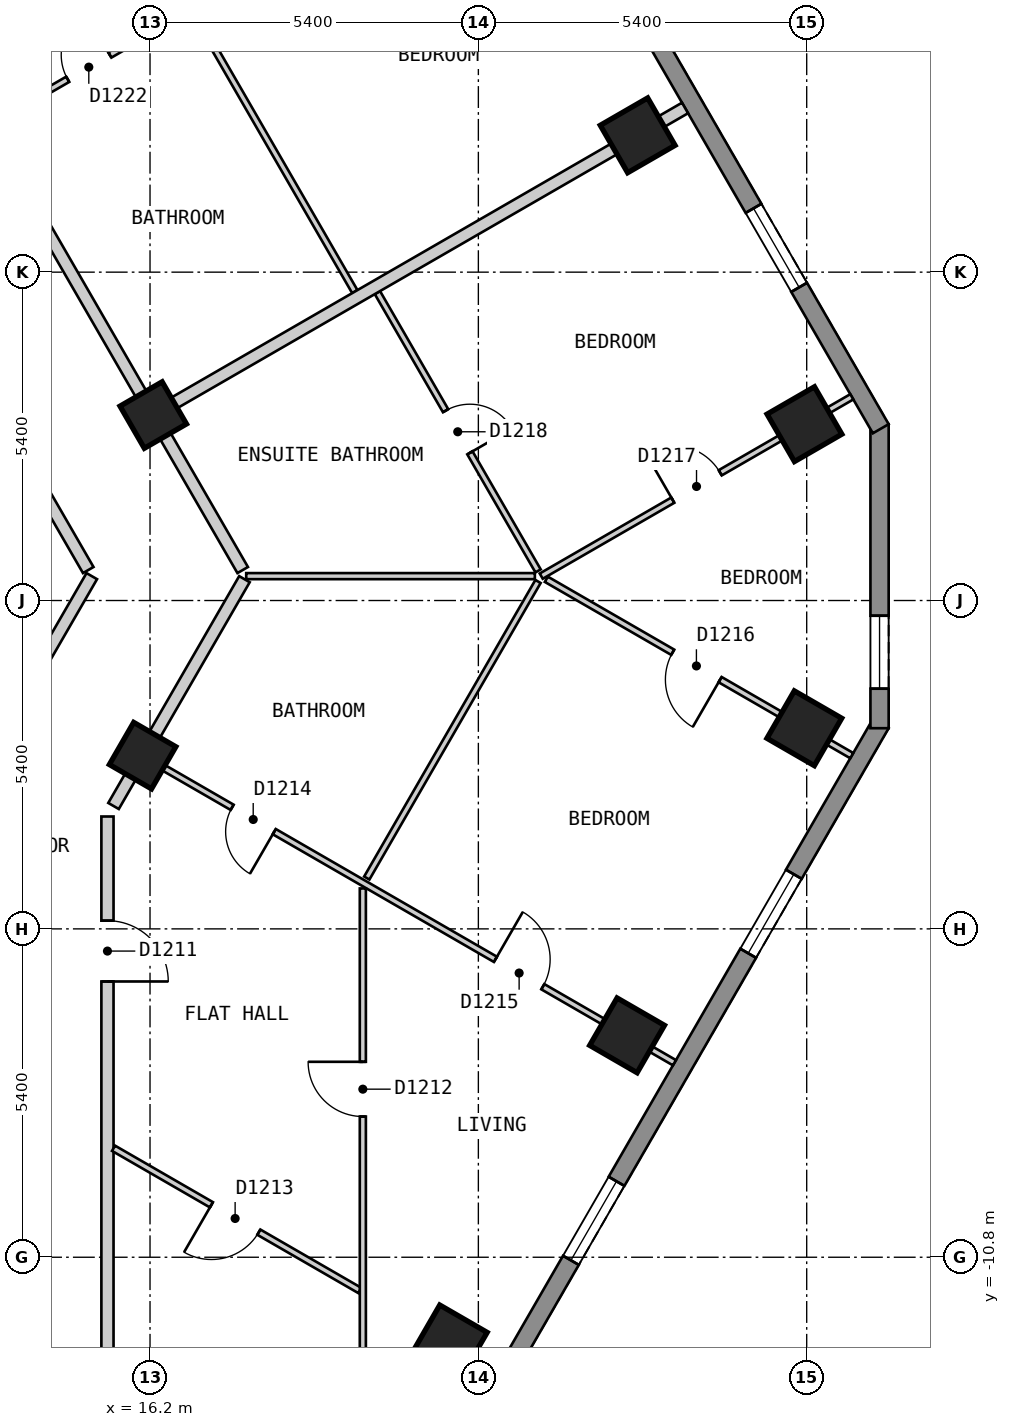
"""IFC4 building model, lengths in metres.
Left out: names, types, materials, properties, quantities, classifications, styles, units other than length and angle.
Written with IfcOpenShell. Run it as: python <this file> out.ifc"""

import sys

from ifc_helpers import new_model, si_unit, direction, frame, frame_2d, origin, origin_2d, place, context, subcontext, project, spatial, polyline, rectangle, outline, extrude, element, fill, save


model = new_model("IFC4")
c1 = context("Model", 3, precision=1e-05, world=origin(), true_north=direction((0.0, 1.0)))
c2 = subcontext(c1, "Body", "Model", "MODEL_VIEW")
j1 = project(units=[si_unit("LENGTHUNIT", "METRE"), si_unit("PLANEANGLEUNIT", "RADIAN")], contexts=[c1])
p1 = place(None, origin())
s1 = spatial("IfcSite", under=j1, at=p1, CompositionType="ELEMENT")
p2 = place(p1, origin())
s2 = spatial("IfcBuilding", under=s1, at=p2, CompositionType="ELEMENT")
p3 = place(p2, frame((0.0, 0.0, 129.6)))
s3 = spatial("IfcBuildingStorey", under=s2, at=p3, CompositionType="ELEMENT", Elevation=129.6)
for number, where, z_axis, x_axis in (
    (1, (21.13, -12.201, 0.0), (0.0, 0.0, 1.0), (0.5, 0.866, 0.0)),
    (2, (24.046, -7.151, 0.0), (0.0, 0.0, 1.0), (0.5, 0.866, 0.0)),
    (3, (26.961, -2.101, 0.0), (0.0, 0.0, 1.0), (0.5, 0.866, 0.0)),
    (4, (26.963, 2.9, 0.0), (0.0, 0.0, 1.0), (-0.5, 0.866, 0.0)),
    (5, (24.22, 7.65, 0.0), (0.0, 0.0, 1.0), (-0.5, 0.866, 0.0)),
):
    element("IfcColumn", number, at=place(p3, frame(where, z_axis=z_axis, x_axis=x_axis)), inside=s3, PredefinedType="COLUMN", context=c2, shape_type="SweptSolid", body=[
        extrude(rectangle(XDim=0.9, YDim=0.9, at=origin_2d()), origin(), (0.0, 0.0, 1.0), 3.0),
    ])
for number, where, z_axis, x_axis in (
    (6, (16.078, -2.551, 0.0), (0.0, 0.0, 1.0), (0.5, 0.866, 0.0)),
    (7, (16.253, 3.05, 0.0), (0.0, 0.0, 1.0), (-0.5, 0.866, 0.0)),
):
    element("IfcColumn", number, at=place(p3, frame(where, z_axis=z_axis, x_axis=x_axis)), inside=s3, PredefinedType="COLUMN", context=c2, shape_type="SweptSolid", body=[
        extrude(rectangle(XDim=0.8, YDim=0.8, at=origin_2d()), origin(), (0.0, 0.0, 1.0), 3.0),
    ])
p4 = place(p3, frame((15.862, -23.425, 0.0), z_axis=(0.0, 0.0, 1.0), x_axis=(0.500017503135, 0.866015298109, 0.0)))
e8 = element("IfcWall", 8, at=p4, inside=s3, PredefinedType="SOLIDWALL", context=c2, shape_type="SweptSolid", body=[
    extrude(outline(polyline([(0.0, -0.15), (24.711, -0.15), (24.631, 0.15), (0.08, 0.15), (0.0, -0.15)])), origin(), (0.0, 0.0, 1.0), 2.7),
])
p5 = place(p4, frame((2.857, 0.0, 0.15)))
e9 = element("IfcOpeningElement", 9, at=p5, cuts=e8, PredefinedType="OPENING", context=c2, shape_type="SweptSolid", body=[
    extrude(rectangle(XDim=1.5, YDim=2.1, at=frame_2d((0.75, 1.05))), frame((0.0, 0.16, 0.0), z_axis=(0.0, -1.0, 0.0), x_axis=(1.0, 0.0, 0.0)), (0.0, 0.0, 1.0), 0.32),
])
p6 = place(p4, frame((8.689, 0.0, 0.15)))
e10 = element("IfcOpeningElement", 10, at=p6, cuts=e8, PredefinedType="OPENING", context=c2, shape_type="SweptSolid", body=[
    extrude(rectangle(XDim=1.5, YDim=2.1, at=frame_2d((0.75, 1.05))), frame((0.0, 0.16, 0.0), z_axis=(0.0, -1.0, 0.0), x_axis=(1.0, 0.0, 0.0)), (0.0, 0.0, 1.0), 0.32),
])
p7 = place(p4, frame((14.52, 0.0, 0.15)))
e11 = element("IfcOpeningElement", 11, at=p7, cuts=e8, PredefinedType="OPENING", context=c2, shape_type="SweptSolid", body=[
    extrude(rectangle(XDim=1.5, YDim=2.1, at=frame_2d((0.75, 1.05))), frame((0.0, 0.16, 0.0), z_axis=(0.0, -1.0, 0.0), x_axis=(1.0, 0.0, 0.0)), (0.0, 0.0, 1.0), 0.32),
])
p8 = place(p4, frame((20.351, 0.0, 0.15)))
e12 = element("IfcOpeningElement", 12, at=p8, cuts=e8, PredefinedType="OPENING", context=c2, shape_type="SweptSolid", body=[
    extrude(rectangle(XDim=1.5, YDim=2.1, at=frame_2d((0.75, 1.05))), frame((0.0, 0.16, 0.0), z_axis=(0.0, -1.0, 0.0), x_axis=(1.0, 0.0, 0.0)), (0.0, 0.0, 1.0), 0.32),
])
p9 = place(p3, frame((28.198, -2.1, 0.0), z_axis=(0.0, 0.0, 1.0), x_axis=(0.0, 1.0, 0.0)))
e13 = element("IfcWall", 13, at=p9, inside=s3, PredefinedType="SOLIDWALL", context=c2, shape_type="SweptSolid", body=[
    extrude(outline(polyline([(0.0, -0.15), (5.0, -0.15), (4.92, 0.15), (0.08, 0.15), (0.0, -0.15)])), origin(), (0.0, 0.0, 1.0), 2.7),
])
p10 = place(p9, frame((0.65, 0.0, 0.15)))
e14 = element("IfcOpeningElement", 14, at=p10, cuts=e13, PredefinedType="OPENING", context=c2, shape_type="SweptSolid", body=[
    extrude(rectangle(XDim=1.2, YDim=2.1, at=frame_2d((0.6, 1.05))), frame((0.0, 0.16, 0.0), z_axis=(0.0, -1.0, 0.0), x_axis=(1.0, 0.0, 0.0)), (0.0, 0.0, 1.0), 0.32),
])
p11 = place(p3, frame((28.218, 2.825, 0.0), z_axis=(0.0, 0.0, 1.0), x_axis=(-0.500020536353, 0.866013546791, 0.0)))
e15 = element("IfcWall", 15, at=p11, inside=s3, PredefinedType="SOLIDWALL", context=c2, shape_type="SweptSolid", body=[
    extrude(outline(polyline([(0.0, -0.15), (23.325, -0.15), (23.245, 0.15), (0.08, 0.15), (0.0, -0.15)])), origin(), (0.0, 0.0, 1.0), 2.7),
])
p12 = place(p11, frame((2.685, 0.0, 0.15)))
e16 = element("IfcOpeningElement", 16, at=p12, cuts=e15, PredefinedType="OPENING", context=c2, shape_type="SweptSolid", body=[
    extrude(rectangle(XDim=1.5, YDim=2.1, at=frame_2d((0.75, 1.05))), frame((0.0, 0.16, 0.0), z_axis=(0.0, -1.0, 0.0), x_axis=(1.0, 0.0, 0.0)), (0.0, 0.0, 1.0), 0.32),
])
p13 = place(p11, frame((8.17, 0.0, 0.15)))
e17 = element("IfcOpeningElement", 17, at=p13, cuts=e15, PredefinedType="OPENING", context=c2, shape_type="SweptSolid", body=[
    extrude(rectangle(XDim=1.5, YDim=2.1, at=frame_2d((0.75, 1.05))), frame((0.0, 0.16, 0.0), z_axis=(0.0, -1.0, 0.0), x_axis=(1.0, 0.0, 0.0)), (0.0, 0.0, 1.0), 0.32),
])
p14 = place(p11, frame((13.655, 0.0, 0.15)))
e18 = element("IfcOpeningElement", 18, at=p14, cuts=e15, PredefinedType="OPENING", context=c2, shape_type="SweptSolid", body=[
    extrude(rectangle(XDim=1.5, YDim=2.1, at=frame_2d((0.75, 1.05))), frame((0.0, 0.16, 0.0), z_axis=(0.0, -1.0, 0.0), x_axis=(1.0, 0.0, 0.0)), (0.0, 0.0, 1.0), 0.32),
])
p15 = place(p11, frame((19.14, 0.0, 0.15)))
e19 = element("IfcOpeningElement", 19, at=p15, cuts=e15, PredefinedType="OPENING", context=c2, shape_type="SweptSolid", body=[
    extrude(rectangle(XDim=1.5, YDim=2.1, at=frame_2d((0.75, 1.05))), frame((0.0, 0.16, 0.0), z_axis=(0.0, -1.0, 0.0), x_axis=(1.0, 0.0, 0.0)), (0.0, 0.0, 1.0), 0.32),
])
p16 = place(p3, frame((7.967, 13.0, 0.0), z_axis=(0.0, 0.0, 1.0), x_axis=(0.50003774998, -0.866003607726, 0.0)))
e20 = element("IfcWall", 20, at=p16, inside=s3, PredefinedType="PARTITIONING", context=c2, shape_type="SweptSolid", body=[
    extrude(rectangle(XDim=14.433, YDim=0.2, at=frame_2d((7.217, 0.0))), origin(), (0.0, 0.0, 1.0), 2.7),
])
p17 = place(p16, frame((6.824, 0.0, 0.0)))
e21 = element("IfcOpeningElement", 21, at=p17, cuts=e20, PredefinedType="OPENING", context=c2, shape_type="SweptSolid", body=[
    extrude(rectangle(XDim=0.9, YDim=2.1, at=frame_2d((0.45, 1.05))), frame((0.0, 0.11, 0.0), z_axis=(0.0, -1.0, 0.0), x_axis=(1.0, 0.0, 0.0)), (0.0, 0.0, 1.0), 0.22),
])
p18 = place(p3, frame((9.296, 15.1, 0.0), z_axis=(0.0, 0.0, 1.0), x_axis=(0.499974024244, -0.866040400375, 0.0)))
e22 = element("IfcWall", 22, at=p18, inside=s3, PredefinedType="PARTITIONING", context=c2, shape_type="SweptSolid", body=[
    extrude(rectangle(XDim=16.857, YDim=0.2, at=frame_2d((8.429, 0.0))), origin(), (0.0, 0.0, 1.0), 2.7),
])
p19 = place(p18, frame((5.187, 0.0, 0.0)))
e23 = element("IfcOpeningElement", 23, at=p19, cuts=e22, PredefinedType="OPENING", context=c2, shape_type="SweptSolid", body=[
    extrude(rectangle(XDim=1.0, YDim=2.1, at=frame_2d((0.5, 1.05))), frame((0.0, 0.11, 0.0), z_axis=(0.0, -1.0, 0.0), x_axis=(1.0, 0.0, 0.0)), (0.0, 0.0, 1.0), 0.22),
])
p20 = place(p3, frame((13.394, -2.8, 0.0), z_axis=(0.0, 0.0, 1.0), x_axis=(0.499968324138, 0.866043691079, 0.0)))
e24 = element("IfcWall", 24, at=p20, inside=s3, PredefinedType="PARTITIONING", context=c2, shape_type="SweptSolid", body=[
    extrude(rectangle(XDim=3.696, YDim=0.2, at=frame_2d((1.848, 0.0))), origin(), (0.0, 0.0, 1.0), 2.7),
])
p21 = place(p3, frame((15.6, -3.379, 0.0), z_axis=(0.0, 0.0, 1.0), x_axis=(0.499882759391, 0.866093082101, 0.0)))
e25 = element("IfcWall", 25, at=p21, inside=s3, PredefinedType="PARTITIONING", context=c2, shape_type="SweptSolid", body=[
    extrude(rectangle(XDim=4.307, YDim=0.2, at=frame_2d((2.153, 0.0))), origin(), (0.0, 0.0, 1.0), 2.7),
])
p22 = place(p3, frame((15.5, -21.199, 0.0), z_axis=(0.0, 0.0, 1.0), x_axis=(0.0, 1.0, 0.0)))
e26 = element("IfcWall", 26, at=p22, inside=s3, PredefinedType="PARTITIONING", context=c2, shape_type="SweptSolid", body=[
    extrude(rectangle(XDim=17.647, YDim=0.2, at=frame_2d((8.823, 0.0))), origin(), (0.0, 0.0, 1.0), 2.7),
])
p23 = place(p22, frame((14.934, 0.0, 0.0)))
e27 = element("IfcOpeningElement", 27, at=p23, cuts=e26, PredefinedType="OPENING", context=c2, shape_type="SweptSolid", body=[
    extrude(rectangle(XDim=1.0, YDim=2.1, at=frame_2d((0.5, 1.05))), frame((0.0, 0.11, 0.0), z_axis=(0.0, -1.0, 0.0), x_axis=(1.0, 0.0, 0.0)), (0.0, 0.0, 1.0), 0.22),
])
p24 = place(p3, frame((11.539, 18.986, 0.0), z_axis=(0.0, 0.0, 1.0), x_axis=(0.500019453803, -0.866014171835, 0.0)))
e28 = element("IfcWall", 28, at=p24, inside=s3, PredefinedType="PARTITIONING", context=c2, shape_type="SweptSolid", body=[
    extrude(rectangle(XDim=16.057, YDim=0.1, at=frame_2d((8.029, 0.0))), origin(), (0.0, 0.0, 1.0), 2.7),
])
p25 = place(p24, frame((7.48, 0.0, 0.0)))
e29 = element("IfcOpeningElement", 29, at=p25, cuts=e28, PredefinedType="OPENING", context=c2, shape_type="SweptSolid", body=[
    extrude(rectangle(XDim=0.9, YDim=2.1, at=frame_2d((0.45, 1.05))), frame((0.0, 0.06, 0.0), z_axis=(0.0, -1.0, 0.0), x_axis=(1.0, 0.0, 0.0)), (0.0, 0.0, 1.0), 0.12),
])
p26 = place(p3, frame((19.94, 5.063, 0.0), z_axis=(0.0, 0.0, 1.0), x_axis=(0.500025085526, -0.866010920165, 0.0)))
e30 = element("IfcWall", 30, at=p26, inside=s3, PredefinedType="PARTITIONING", context=c2, shape_type="SweptSolid", body=[
    extrude(rectangle(XDim=5.284, YDim=0.1, at=frame_2d((2.642, 0.0))), origin(), (0.0, 0.0, 1.0), 2.7),
])
p27 = place(p26, frame((2.242, 0.0, 0.0)))
e31 = element("IfcOpeningElement", 31, at=p27, cuts=e30, PredefinedType="OPENING", context=c2, shape_type="SweptSolid", body=[
    extrude(rectangle(XDim=0.8, YDim=2.1, at=frame_2d((0.4, 1.05))), frame((0.0, 0.06, 0.0), z_axis=(0.0, -1.0, 0.0), x_axis=(1.0, 0.0, 0.0)), (0.0, 0.0, 1.0), 0.12),
])
p28 = place(p3, frame((15.6, -9.008, 0.0), z_axis=(0.0, 0.0, 1.0), x_axis=(0.866049960314, -0.49995746443, 0.0)))
e32 = element("IfcWall", 32, at=p28, inside=s3, PredefinedType="PARTITIONING", context=c2, shape_type="SweptSolid", body=[
    extrude(rectangle(XDim=4.676, YDim=0.1, at=frame_2d((2.338, 0.0))), origin(), (0.0, 0.0, 1.0), 2.7),
])
p29 = place(p28, frame((1.859, 0.0, 0.0)))
e33 = element("IfcOpeningElement", 33, at=p29, cuts=e32, PredefinedType="OPENING", context=c2, shape_type="SweptSolid", body=[
    extrude(rectangle(XDim=0.9, YDim=2.1, at=frame_2d((0.45, 1.05))), frame((0.0, 0.06, 0.0), z_axis=(0.0, -1.0, 0.0), x_axis=(1.0, 0.0, 0.0)), (0.0, 0.0, 1.0), 0.12),
])
p30 = place(p3, frame((16.165, -2.601, 0.0), z_axis=(0.0, 0.0, 1.0), x_axis=(0.866016855193, -0.500014806302, 0.0)))
e34 = element("IfcWall", 34, at=p30, inside=s3, PredefinedType="PARTITIONING", context=c2, shape_type="SweptSolid", body=[
    extrude(rectangle(XDim=10.0, YDim=0.1, at=frame_2d((5.0, 0.0))), origin(), (0.0, 0.0, 1.0), 2.7),
])
p31 = place(p30, frame((1.6, 0.0, 0.0)))
e35 = element("IfcOpeningElement", 35, at=p31, cuts=e34, PredefinedType="OPENING", context=c2, shape_type="SweptSolid", body=[
    extrude(rectangle(XDim=0.8, YDim=2.1, at=frame_2d((0.4, 1.05))), frame((0.0, 0.06, 0.0), z_axis=(0.0, -1.0, 0.0), x_axis=(1.0, 0.0, 0.0)), (0.0, 0.0, 1.0), 0.12),
])
p32 = place(p30, frame((6.6, 0.0, 0.0)))
e36 = element("IfcOpeningElement", 36, at=p32, cuts=e34, PredefinedType="OPENING", context=c2, shape_type="SweptSolid", body=[
    extrude(rectangle(XDim=0.9, YDim=2.1, at=frame_2d((0.45, 1.05))), frame((0.0, 0.06, 0.0), z_axis=(0.0, -1.0, 0.0), x_axis=(1.0, 0.0, 0.0)), (0.0, 0.0, 1.0), 0.12),
])
p33 = place(p3, frame((22.718, 0.349, 0.0), z_axis=(0.0, 0.0, 1.0), x_axis=(0.86601454848, -0.500018801468, 0.0)))
e37 = element("IfcWall", 37, at=p33, inside=s3, PredefinedType="PARTITIONING", context=c2, shape_type="SweptSolid", body=[
    extrude(rectangle(XDim=5.8, YDim=0.1, at=frame_2d((2.9, 0.0))), origin(), (0.0, 0.0, 1.0), 2.7),
])
p34 = place(p33, frame((2.4, 0.0, 0.0)))
e38 = element("IfcOpeningElement", 38, at=p34, cuts=e37, PredefinedType="OPENING", context=c2, shape_type="SweptSolid", body=[
    extrude(rectangle(XDim=0.9, YDim=2.1, at=frame_2d((0.45, 1.05))), frame((0.0, 0.06, 0.0), z_axis=(0.0, -1.0, 0.0), x_axis=(1.0, 0.0, 0.0)), (0.0, 0.0, 1.0), 0.12),
])
p35 = place(p3, frame((17.782, 0.401, 0.0), z_axis=(0.0, 0.0, 1.0), x_axis=(1.0, 0.0, 0.0)))
e39 = element("IfcWall", 39, at=p35, inside=s3, PredefinedType="PARTITIONING", context=c2, shape_type="SweptSolid", body=[
    extrude(rectangle(XDim=4.747, YDim=0.1, at=frame_2d((2.374, 0.0))), origin(), (0.0, 0.0, 1.0), 2.7),
])
p36 = place(p3, frame((19.765, -4.564, 0.0), z_axis=(0.0, 0.0, 1.0), x_axis=(0.500060182325, 0.865990654714, 0.0)))
e40 = element("IfcWall", 40, at=p36, inside=s3, PredefinedType="PARTITIONING", context=c2, shape_type="SweptSolid", body=[
    extrude(rectangle(XDim=5.632, YDim=0.1, at=frame_2d((2.816, 0.0))), origin(), (0.0, 0.0, 1.0), 2.7),
])
p37 = place(p3, frame((19.7, -16.477, 0.0), z_axis=(0.0, 0.0, 1.0), x_axis=(0.0, 1.0, 0.0)))
e41 = element("IfcWall", 41, at=p37, inside=s3, PredefinedType="PARTITIONING", context=c2, shape_type="SweptSolid", body=[
    extrude(rectangle(XDim=11.742, YDim=0.1, at=frame_2d((5.871, 0.0))), origin(), (0.0, 0.0, 1.0), 2.7),
])
p38 = place(p37, frame((7.991, 0.0, 0.0)))
e42 = element("IfcOpeningElement", 42, at=p38, cuts=e41, PredefinedType="OPENING", context=c2, shape_type="SweptSolid", body=[
    extrude(rectangle(XDim=0.9, YDim=2.1, at=frame_2d((0.45, 1.05))), frame((0.0, 0.06, 0.0), z_axis=(0.0, -1.0, 0.0), x_axis=(1.0, 0.0, 0.0)), (0.0, 0.0, 1.0), 0.12),
])
p39 = place(p3, frame((22.634, 0.401, 0.0), z_axis=(0.0, 0.0, 1.0), x_axis=(0.86601325737, 0.500021037617, 0.0)))
e43 = element("IfcWall", 43, at=p39, inside=s3, PredefinedType="PARTITIONING", context=c2, shape_type="SweptSolid", body=[
    extrude(rectangle(XDim=5.898, YDim=0.1, at=frame_2d((2.949, 0.0))), origin(), (0.0, 0.0, 1.0), 2.7),
])
p40 = place(p39, frame((2.499, 0.0, 0.0)))
e44 = element("IfcOpeningElement", 44, at=p40, cuts=e43, PredefinedType="OPENING", context=c2, shape_type="SweptSolid", body=[
    extrude(rectangle(XDim=0.9, YDim=2.1, at=frame_2d((0.45, 1.05))), frame((0.0, 0.06, 0.0), z_axis=(0.0, -1.0, 0.0), x_axis=(1.0, 0.0, 0.0)), (0.0, 0.0, 1.0), 0.12),
])
p41 = place(p3, frame((13.597, 7.85, 0.0), z_axis=(0.0, 0.0, 1.0), x_axis=(0.8660642533, 0.499932704626, 0.0)))
e45 = element("IfcWall", 45, at=p41, inside=s3, PredefinedType="PARTITIONING", context=c2, shape_type="SweptSolid", body=[
    extrude(rectangle(XDim=3.786, YDim=0.1, at=frame_2d((1.893, 0.0))), origin(), (0.0, 0.0, 1.0), 2.7),
])
p42 = place(p41, frame((1.443, 0.0, 0.0)))
e46 = element("IfcOpeningElement", 46, at=p42, cuts=e45, PredefinedType="OPENING", context=c2, shape_type="SweptSolid", body=[
    extrude(rectangle(XDim=0.8, YDim=2.1, at=frame_2d((0.4, 1.05))), frame((0.0, 0.06, 0.0), z_axis=(0.0, -1.0, 0.0), x_axis=(1.0, 0.0, 0.0)), (0.0, 0.0, 1.0), 0.12),
])
p43 = place(p3, frame((16.339, 3.1, 0.0), z_axis=(0.0, 0.0, 1.0), x_axis=(0.866016855193, 0.500014806302, 0.0)))
e47 = element("IfcWall", 47, at=p43, inside=s3, PredefinedType="PARTITIONING", context=c2, shape_type="SweptSolid", body=[
    extrude(rectangle(XDim=10.0, YDim=0.2, at=frame_2d((5.0, 0.0))), origin(), (0.0, 0.0, 1.0), 2.7),
])
p44 = place(p7, origin())
e48 = element("IfcWindow", 48, at=p44, inside=s3, PartitioningType="SINGLE_PANEL", PredefinedType="WINDOW", context=c2, shape_type="SweptSolid", body=[
    extrude(rectangle(XDim=1.5, YDim=2.1, at=frame_2d((0.75, 1.05))), frame((0.0, 0.03, 0.0), z_axis=(0.0, -1.0, 0.0), x_axis=(1.0, 0.0, 0.0)), (0.0, 0.0, 1.0), 0.06),
])
fill(e11, e48)
p45 = place(p8, origin())
e49 = element("IfcWindow", 49, at=p45, inside=s3, PartitioningType="SINGLE_PANEL", PredefinedType="WINDOW", context=c2, shape_type="SweptSolid", body=[
    extrude(rectangle(XDim=1.5, YDim=2.1, at=frame_2d((0.75, 1.05))), frame((0.0, 0.03, 0.0), z_axis=(0.0, -1.0, 0.0), x_axis=(1.0, 0.0, 0.0)), (0.0, 0.0, 1.0), 0.06),
])
fill(e12, e49)
p46 = place(p10, origin())
e50 = element("IfcWindow", 50, at=p46, inside=s3, PartitioningType="SINGLE_PANEL", PredefinedType="WINDOW", context=c2, shape_type="SweptSolid", body=[
    extrude(rectangle(XDim=1.2, YDim=2.1, at=frame_2d((0.6, 1.05))), frame((0.0, 0.03, 0.0), z_axis=(0.0, -1.0, 0.0), x_axis=(1.0, 0.0, 0.0)), (0.0, 0.0, 1.0), 0.06),
])
fill(e14, e50)
p47 = place(p12, origin())
e51 = element("IfcWindow", 51, at=p47, inside=s3, PartitioningType="SINGLE_PANEL", PredefinedType="WINDOW", context=c2, shape_type="SweptSolid", body=[
    extrude(rectangle(XDim=1.5, YDim=2.1, at=frame_2d((0.75, 1.05))), frame((0.0, 0.03, 0.0), z_axis=(0.0, -1.0, 0.0), x_axis=(1.0, 0.0, 0.0)), (0.0, 0.0, 1.0), 0.06),
])
fill(e16, e51)
p48 = place(p23, origin())
e52 = element("IfcDoor", 52, at=p48, inside=s3, OperationType="SINGLE_SWING_LEFT", PredefinedType="DOOR", context=c2, shape_type="SweptSolid", body=[
    extrude(rectangle(XDim=1.0, YDim=2.1, at=frame_2d((0.5, 1.05))), frame((0.0, 0.025, 0.0), z_axis=(0.0, -1.0, 0.0), x_axis=(1.0, 0.0, 0.0)), (0.0, 0.0, 1.0), 0.05),
])
fill(e27, e52)
p49 = place(p38, origin())
e53 = element("IfcDoor", 53, at=p49, inside=s3, OperationType="SINGLE_SWING_RIGHT", PredefinedType="DOOR", context=c2, shape_type="SweptSolid", body=[
    extrude(rectangle(XDim=0.9, YDim=2.1, at=frame_2d((0.45, 1.05))), frame((0.0, 0.025, 0.0), z_axis=(0.0, -1.0, 0.0), x_axis=(1.0, 0.0, 0.0)), (0.0, 0.0, 1.0), 0.05),
])
fill(e42, e53)
p50 = place(p29, origin())
e54 = element("IfcDoor", 54, at=p50, inside=s3, OperationType="SINGLE_SWING_LEFT", PredefinedType="DOOR", context=c2, shape_type="SweptSolid", body=[
    extrude(rectangle(XDim=0.9, YDim=2.1, at=frame_2d((0.45, 1.05))), frame((0.0, 0.025, 0.0), z_axis=(0.0, -1.0, 0.0), x_axis=(1.0, 0.0, 0.0)), (0.0, 0.0, 1.0), 0.05),
])
fill(e33, e54)
p51 = place(p31, origin())
e55 = element("IfcDoor", 55, at=p51, inside=s3, OperationType="SINGLE_SWING_RIGHT", PredefinedType="DOOR", context=c2, shape_type="SweptSolid", body=[
    extrude(rectangle(XDim=0.8, YDim=2.1, at=frame_2d((0.4, 1.05))), frame((0.0, 0.025, 0.0), z_axis=(0.0, -1.0, 0.0), x_axis=(1.0, 0.0, 0.0)), (0.0, 0.0, 1.0), 0.05),
])
fill(e35, e55)
p52 = place(p32, origin())
e56 = element("IfcDoor", 56, at=p52, inside=s3, OperationType="SINGLE_SWING_LEFT", PredefinedType="DOOR", context=c2, shape_type="SweptSolid", body=[
    extrude(rectangle(XDim=0.9, YDim=2.1, at=frame_2d((0.45, 1.05))), frame((0.0, 0.025, 0.0), z_axis=(0.0, -1.0, 0.0), x_axis=(1.0, 0.0, 0.0)), (0.0, 0.0, 1.0), 0.05),
])
fill(e36, e56)
p53 = place(p34, origin())
e57 = element("IfcDoor", 57, at=p53, inside=s3, OperationType="SINGLE_SWING_RIGHT", PredefinedType="DOOR", context=c2, shape_type="SweptSolid", body=[
    extrude(rectangle(XDim=0.9, YDim=2.1, at=frame_2d((0.45, 1.05))), frame((0.0, 0.025, 0.0), z_axis=(0.0, -1.0, 0.0), x_axis=(1.0, 0.0, 0.0)), (0.0, 0.0, 1.0), 0.05),
])
fill(e38, e57)
p54 = place(p40, origin())
e58 = element("IfcDoor", 58, at=p54, inside=s3, OperationType="SINGLE_SWING_LEFT", PredefinedType="DOOR", context=c2, shape_type="SweptSolid", body=[
    extrude(rectangle(XDim=0.9, YDim=2.1, at=frame_2d((0.45, 1.05))), frame((0.0, 0.025, 0.0), z_axis=(0.0, -1.0, 0.0), x_axis=(1.0, 0.0, 0.0)), (0.0, 0.0, 1.0), 0.05),
])
fill(e44, e58)
p55 = place(p27, origin())
e59 = element("IfcDoor", 59, at=p55, inside=s3, OperationType="SINGLE_SWING_RIGHT", PredefinedType="DOOR", context=c2, shape_type="SweptSolid", body=[
    extrude(rectangle(XDim=0.8, YDim=2.1, at=frame_2d((0.4, 1.05))), frame((0.0, 0.025, 0.0), z_axis=(0.0, -1.0, 0.0), x_axis=(1.0, 0.0, 0.0)), (0.0, 0.0, 1.0), 0.05),
])
fill(e31, e59)
p56 = place(p42, origin())
e60 = element("IfcDoor", 60, at=p56, inside=s3, OperationType="SINGLE_SWING_RIGHT", PredefinedType="DOOR", context=c2, shape_type="SweptSolid", body=[
    extrude(rectangle(XDim=0.8, YDim=2.1, at=frame_2d((0.4, 1.05))), frame((0.0, 0.025, 0.0), z_axis=(0.0, -1.0, 0.0), x_axis=(1.0, 0.0, 0.0)), (0.0, 0.0, 1.0), 0.05),
])
fill(e46, e60)
save(model, sys.argv[1])
